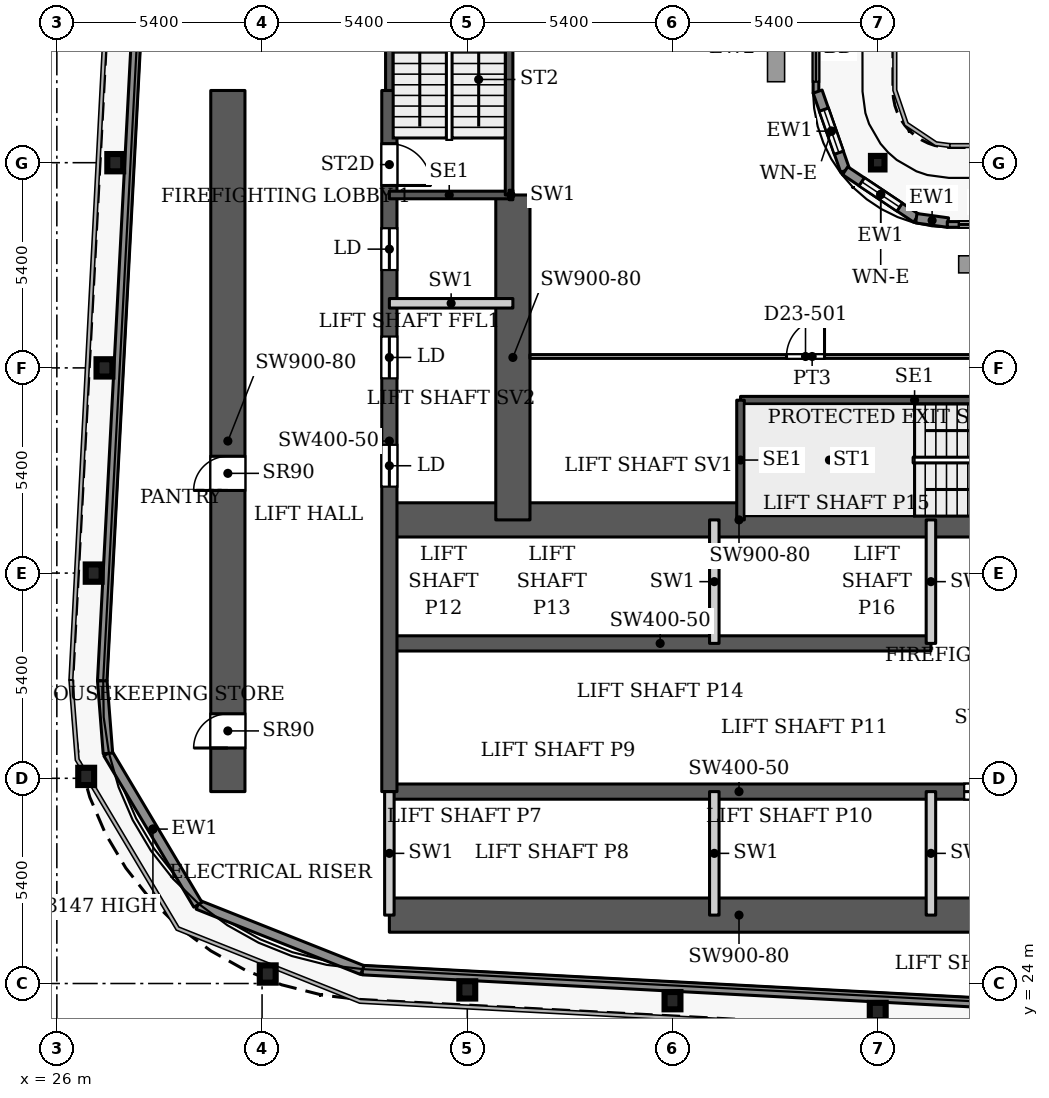
"""IFC4 building model, lengths in metres.
Left out: names, types, materials, properties, quantities, classifications, styles, units other than length and angle.
Written with IfcOpenShell. Run it as: python <this file> out.ifc"""

import sys

from ifc_helpers import new_model, si_unit, direction, frame, frame_2d, origin, origin_2d, place, context, subcontext, project, spatial, rectangle, hollow_rectangle, i_section, extrude, source, transform, mapped, element, fill, save


model = new_model("IFC4")
c1 = context("Model", 3, precision=1e-05, world=origin(), true_north=direction((0.0, 1.0)))
c2 = subcontext(c1, "Body", "Model", "MODEL_VIEW")
j1 = project(units=[si_unit("LENGTHUNIT", "METRE"), si_unit("PLANEANGLEUNIT", "RADIAN")], contexts=[c1])
p1 = place(None, origin())
s1 = spatial("IfcSite", under=j1, at=p1, CompositionType="ELEMENT")
p2 = place(p1, origin())
s2 = spatial("IfcBuilding", under=s1, at=p2, CompositionType="ELEMENT")
p3 = place(p2, frame((0.0, 0.0, 105.8)))
s3 = spatial("IfcBuildingStorey", under=s2, at=p3, CompositionType="ELEMENT", Elevation=105.8)
for number, where, z_axis, x_axis in (
    (1, (47.6, 23.264, 0.0), (0.0, 0.0, 1.0), (1.0, 0.0, 0.0)),
    (2, (42.2, 23.548, 0.0), (0.0, 0.0, 1.0), (1.0, 0.0, 0.0)),
    (3, (36.8, 23.832, 0.0), (0.0, 0.0, 1.0), (1.0, 0.0, 0.0)),
    (4, (31.549, 24.25, 0.0), (0.0, 0.0, 1.0), (1.0, 0.0, 0.0)),
    (5, (26.772, 29.45, 0.0), (0.0, 0.0, 1.0), (1.0, 0.0, 0.0)),
    (6, (26.969, 34.8, 0.0), (0.0, 0.0, 1.0), (1.0, 0.0, 0.0)),
    (7, (27.253, 40.2, 0.0), (0.0, 0.0, 1.0), (1.0, 0.0, 0.0)),
    (8, (27.537, 45.6, 0.0), (0.0, 0.0, 1.0), (1.0, 0.0, 0.0)),
):
    element("IfcColumn", number, at=place(p3, frame(where, z_axis=z_axis, x_axis=x_axis)), inside=s3, PredefinedType="COLUMN", context=c2, shape_type="SweptSolid", body=[
        extrude(i_section(OverallWidth=0.418, OverallDepth=0.455, WebThickness=0.042, FlangeThickness=0.068, FilletRadius=0.014, at=origin_2d()), origin(), (0.0, 0.0, 1.0), 3.9),
    ])
p4 = place(p3, frame((47.6, 45.6, 0.0), z_axis=(0.0, 0.0, 1.0), x_axis=(1.0, 0.0, 0.0)))
e9 = element("IfcColumn", 9, at=p4, inside=s3, PredefinedType="COLUMN", context=c2, shape_type="SweptSolid", body=[
    extrude(hollow_rectangle(XDim=0.356, YDim=0.356, WallThickness=0.016, InnerFilletRadius=0.016, OuterFilletRadius=0.032, at=origin_2d()), origin(), (0.0, 0.0, 1.0), 3.9),
])
p5 = place(p3, frame((34.75, 25.8, 0.0), z_axis=(0.0, 0.0, 1.0), x_axis=(1.0, 0.0, 0.0)))
e10 = element("IfcWall", 10, at=p5, inside=s3, PredefinedType="SHEAR", context=c2, shape_type="SweptSolid", body=[
    extrude(rectangle(XDim=18.4, YDim=0.9, at=frame_2d((9.2, 0.0))), origin(), (0.0, 0.0, 1.0), 3.9),
])
p6 = place(p3, frame((34.75, 29.05, 0.0), z_axis=(0.0, 0.0, 1.0), x_axis=(1.0, 0.0, 0.0)))
e11 = element("IfcWall", 11, at=p6, inside=s3, PredefinedType="SHEAR", context=c2, shape_type="SweptSolid", body=[
    extrude(rectangle(XDim=18.4, YDim=0.4, at=frame_2d((9.2, 0.0))), origin(), (0.0, 0.0, 1.0), 3.9),
])
p7 = place(p6, frame((15.125, 0.0, 0.0)))
e12 = element("IfcOpeningElement", 12, at=p7, cuts=e11, PredefinedType="OPENING", context=c2, shape_type="SweptSolid", body=[
    extrude(rectangle(XDim=1.1, YDim=2.2, at=frame_2d((0.55, 1.1))), frame((0.0, 0.21, 0.0), z_axis=(0.0, -1.0, 0.0), x_axis=(1.0, 0.0, 0.0)), (0.0, 0.0, 1.0), 0.42),
])
p8 = place(p3, frame((34.75, 32.95, 0.0), z_axis=(0.0, 0.0, 1.0), x_axis=(1.0, 0.0, 0.0)))
e13 = element("IfcWall", 13, at=p8, inside=s3, PredefinedType="SHEAR", context=c2, shape_type="SweptSolid", body=[
    extrude(rectangle(XDim=14.25, YDim=0.4, at=frame_2d((7.125, 0.0))), origin(), (0.0, 0.0, 1.0), 3.9),
])
p9 = place(p3, frame((34.75, 36.2, 0.0), z_axis=(0.0, 0.0, 1.0), x_axis=(1.0, 0.0, 0.0)))
e14 = element("IfcWall", 14, at=p9, inside=s3, PredefinedType="SHEAR", context=c2, shape_type="SweptSolid", body=[
    extrude(rectangle(XDim=18.4, YDim=0.9, at=frame_2d((9.2, 0.0))), origin(), (0.0, 0.0, 1.0), 3.9),
])
p10 = place(p9, frame((16.9, 0.0, 0.0)))
e15 = element("IfcOpeningElement", 15, at=p10, cuts=e14, PredefinedType="OPENING", context=c2, shape_type="SweptSolid", body=[
    extrude(rectangle(XDim=1.0, YDim=2.2, at=frame_2d((0.5, 1.1))), frame((0.0, 0.46, 0.0), z_axis=(0.0, -1.0, 0.0), x_axis=(1.0, 0.0, 0.0)), (0.0, 0.0, 1.0), 0.92),
])
p11 = place(p3, frame((34.75, 29.05, 0.0), z_axis=(0.0, 0.0, 1.0), x_axis=(0.0, 1.0, 0.0)))
e16 = element("IfcWall", 16, at=p11, inside=s3, PredefinedType="SHEAR", context=c2, shape_type="SweptSolid", body=[
    extrude(rectangle(XDim=18.45, YDim=0.4, at=frame_2d((9.225, 0.0))), origin(), (0.0, 0.0, 1.0), 3.9),
])
p12 = place(p11, frame((8.025, 0.0, 0.0)))
e17 = element("IfcOpeningElement", 17, at=p12, cuts=e16, PredefinedType="OPENING", context=c2, shape_type="SweptSolid", body=[
    extrude(rectangle(XDim=1.1, YDim=2.2, at=frame_2d((0.55, 1.1))), frame((0.0, 0.21, 0.0), z_axis=(0.0, -1.0, 0.0), x_axis=(1.0, 0.0, 0.0)), (0.0, 0.0, 1.0), 0.42),
])
p13 = place(p11, frame((10.875, 0.0, 0.0)))
e18 = element("IfcOpeningElement", 18, at=p13, cuts=e16, PredefinedType="OPENING", context=c2, shape_type="SweptSolid", body=[
    extrude(rectangle(XDim=1.1, YDim=2.2, at=frame_2d((0.55, 1.1))), frame((0.0, 0.21, 0.0), z_axis=(0.0, -1.0, 0.0), x_axis=(1.0, 0.0, 0.0)), (0.0, 0.0, 1.0), 0.42),
])
p14 = place(p11, frame((13.725, 0.0, 0.0)))
e19 = element("IfcOpeningElement", 19, at=p14, cuts=e16, PredefinedType="OPENING", context=c2, shape_type="SweptSolid", body=[
    extrude(rectangle(XDim=1.1, YDim=2.2, at=frame_2d((0.55, 1.1))), frame((0.0, 0.21, 0.0), z_axis=(0.0, -1.0, 0.0), x_axis=(1.0, 0.0, 0.0)), (0.0, 0.0, 1.0), 0.42),
])
p15 = place(p11, frame((15.95, 0.0, 0.0)))
e20 = element("IfcOpeningElement", 20, at=p15, cuts=e16, PredefinedType="OPENING", context=c2, shape_type="SweptSolid", body=[
    extrude(rectangle(XDim=1.1, YDim=2.2, at=frame_2d((0.55, 1.1))), frame((0.0, 0.21, 0.0), z_axis=(0.0, -1.0, 0.0), x_axis=(1.0, 0.0, 0.0)), (0.0, 0.0, 1.0), 0.42),
])
p16 = place(p3, frame((38.0, 36.2, 0.0), z_axis=(0.0, 0.0, 1.0), x_axis=(0.0, 1.0, 0.0)))
e21 = element("IfcWall", 21, at=p16, inside=s3, PredefinedType="SHEAR", context=c2, shape_type="SweptSolid", body=[
    extrude(rectangle(XDim=8.55, YDim=0.9, at=frame_2d((4.275, 0.0))), origin(), (0.0, 0.0, 1.0), 3.9),
])
p17 = place(p3, frame((30.5, 29.05, 0.0), z_axis=(0.0, 0.0, 1.0), x_axis=(0.0, 1.0, 0.0)))
e22 = element("IfcWall", 22, at=p17, inside=s3, PredefinedType="SHEAR", context=c2, shape_type="SweptSolid", body=[
    extrude(rectangle(XDim=18.45, YDim=0.9, at=frame_2d((9.225, 0.0))), origin(), (0.0, 0.0, 1.0), 3.9),
])
p18 = place(p17, frame((1.147, 0.0, 0.0)))
e23 = element("IfcOpeningElement", 23, at=p18, cuts=e22, PredefinedType="OPENING", context=c2, shape_type="SweptSolid", body=[
    extrude(rectangle(XDim=0.9, YDim=2.2, at=frame_2d((0.45, 1.1))), frame((0.0, 0.46, 0.0), z_axis=(0.0, -1.0, 0.0), x_axis=(1.0, 0.0, 0.0)), (0.0, 0.0, 1.0), 0.92),
])
p19 = place(p17, frame((7.925, 0.0, 0.0)))
e24 = element("IfcOpeningElement", 24, at=p19, cuts=e22, PredefinedType="OPENING", context=c2, shape_type="SweptSolid", body=[
    extrude(rectangle(XDim=0.9, YDim=2.2, at=frame_2d((0.45, 1.1))), frame((0.0, 0.46, 0.0), z_axis=(0.0, -1.0, 0.0), x_axis=(1.0, 0.0, 0.0)), (0.0, 0.0, 1.0), 0.92),
])
p20 = place(p3, frame((45.975, 49.83, 0.0), z_axis=(0.0, 0.0, 1.0), x_axis=(0.0, -1.0, 0.0)))
e25 = element("IfcWall", 25, at=p20, inside=s3, PredefinedType="SOLIDWALL", context=c2, shape_type="SweptSolid", body=[
    extrude(rectangle(XDim=2.4, YDim=0.15, at=frame_2d((1.2, 0.0))), origin(), (0.0, 0.0, 1.0), 3.75),
])
p21 = place(p20, frame((0.3, 0.0, 0.0)))
e26 = element("IfcOpeningElement", 26, at=p21, cuts=e25, PredefinedType="OPENING", context=c2, shape_type="SweptSolid", body=[
    extrude(rectangle(XDim=1.8, YDim=2.4, at=frame_2d((0.9, 1.2))), frame((0.0, 0.085, 0.0), z_axis=(0.0, -1.0, 0.0), x_axis=(1.0, 0.0, 0.0)), (0.0, 0.0, 1.0), 0.17),
])
p22 = place(p3, frame((46.018, 47.471, 0.0), z_axis=(0.0, 0.0, 1.0), x_axis=(0.328791208903, -0.944402637093, 0.0)))
e27 = element("IfcWall", 27, at=p22, inside=s3, PredefinedType="SOLIDWALL", context=c2, shape_type="SweptSolid", body=[
    extrude(rectangle(XDim=2.205, YDim=0.25, at=frame_2d((1.102, 0.0))), origin(), (0.0, 0.0, 1.0), 3.75),
])
p23 = place(p22, frame((0.503, 0.0, 0.6)))
e28 = element("IfcOpeningElement", 28, at=p23, cuts=e27, PredefinedType="OPENING", context=c2, shape_type="SweptSolid", body=[
    extrude(rectangle(XDim=1.2, YDim=2.1, at=frame_2d((0.6, 1.05))), frame((0.0, 0.135, 0.0), z_axis=(0.0, -1.0, 0.0), x_axis=(1.0, 0.0, 0.0)), (0.0, 0.0, 1.0), 0.27),
])
p24 = place(p3, frame((46.743, 45.389, 0.0), z_axis=(0.0, 0.0, 1.0), x_axis=(0.831449265529, -0.555600682912, 0.0)))
e29 = element("IfcWall", 29, at=p24, inside=s3, PredefinedType="SOLIDWALL", context=c2, shape_type="SweptSolid", body=[
    extrude(rectangle(XDim=2.251, YDim=0.25, at=frame_2d((1.126, 0.0))), origin(), (0.0, 0.0, 1.0), 3.75),
])
p25 = place(p24, frame((0.525, 0.0, 0.6)))
e30 = element("IfcOpeningElement", 30, at=p25, cuts=e29, PredefinedType="OPENING", context=c2, shape_type="SweptSolid", body=[
    extrude(rectangle(XDim=1.2, YDim=2.1, at=frame_2d((0.6, 1.05))), frame((0.0, 0.135, 0.0), z_axis=(0.0, -1.0, 0.0), x_axis=(1.0, 0.0, 0.0)), (0.0, 0.0, 1.0), 0.27),
])
p26 = place(p3, frame((48.615, 44.138, 0.0), z_axis=(0.0, 0.0, 1.0), x_axis=(0.990741504246, -0.135761819977, 0.0)))
e31 = element("IfcWall", 31, at=p26, inside=s3, PredefinedType="SOLIDWALL", context=c2, shape_type="SweptSolid", body=[
    extrude(rectangle(XDim=0.84, YDim=0.25, at=frame_2d((0.42, 0.0))), origin(), (0.0, 0.0, 1.0), 3.75),
])
p27 = place(p3, frame((49.43, 43.975, 0.0), z_axis=(0.0, 0.0, 1.0), x_axis=(1.0, 0.0, 0.0)))
e32 = element("IfcWall", 32, at=p27, inside=s3, PredefinedType="SOLIDWALL", context=c2, shape_type="SweptSolid", body=[
    extrude(rectangle(XDim=2.4, YDim=0.15, at=frame_2d((1.2, 0.0))), origin(), (0.0, 0.0, 1.0), 3.75),
])
p28 = place(p27, frame((0.3, 0.0, 0.0)))
e33 = element("IfcOpeningElement", 33, at=p28, cuts=e32, PredefinedType="OPENING", context=c2, shape_type="SweptSolid", body=[
    extrude(rectangle(XDim=1.8, YDim=2.4, at=frame_2d((0.9, 1.2))), frame((0.0, 0.085, 0.0), z_axis=(0.0, -1.0, 0.0), x_axis=(1.0, 0.0, 0.0)), (0.0, 0.0, 1.0), 0.17),
])
p29 = place(p3, frame((100.586, 20.85, 0.0), z_axis=(0.0, 0.0, 1.0), x_axis=(-0.99861746497, 0.052565755559, 0.0)))
e34 = element("IfcWall", 34, at=p29, inside=s3, PredefinedType="SOLIDWALL", context=c2, shape_type="SweptSolid", body=[
    extrude(rectangle(XDim=66.639, YDim=0.25, at=frame_2d((33.319, 0.0))), origin(), (0.0, 0.0, 1.0), 3.75),
])
p30 = place(p3, frame((34.039, 24.353, 0.0), z_axis=(0.0, 0.0, 1.0), x_axis=(-0.929352825399, 0.369192803184, 0.0)))
e35 = element("IfcWall", 35, at=p30, inside=s3, PredefinedType="SOLIDWALL", context=c2, shape_type="SweptSolid", body=[
    extrude(rectangle(XDim=4.656, YDim=0.25, at=frame_2d((2.328, 0.0))), origin(), (0.0, 0.0, 1.0), 3.75),
])
p31 = place(p3, frame((29.712, 26.072, 0.0), z_axis=(0.0, 0.0, 1.0), x_axis=(-0.511028049012, 0.859564036662, 0.0)))
e36 = element("IfcWall", 36, at=p31, inside=s3, PredefinedType="SOLIDWALL", context=c2, shape_type="SweptSolid", body=[
    extrude(rectangle(XDim=4.634, YDim=0.25, at=frame_2d((2.317, 0.0))), origin(), (0.0, 0.0, 1.0), 3.147),
])
p32 = place(p3, frame((27.344, 30.055, 0.0), z_axis=(0.0, 0.0, 1.0), x_axis=(-0.077571675317, 0.99698677784, 0.0)))
e37 = element("IfcWall", 37, at=p32, inside=s3, PredefinedType="SOLIDWALL", context=c2, shape_type="SweptSolid", body=[
    extrude(rectangle(XDim=1.92, YDim=0.25, at=frame_2d((0.96, 0.0))), origin(), (0.0, 0.0, 1.0), 3.75),
])
p33 = place(p3, frame((27.195, 31.969, 0.0), z_axis=(0.0, 0.0, 1.0), x_axis=(0.052555284099, 0.998618016117, 0.0)))
e38 = element("IfcWall", 38, at=p33, inside=s3, PredefinedType="SOLIDWALL", context=c2, shape_type="SweptSolid", body=[
    extrude(rectangle(XDim=61.38, YDim=0.25, at=frame_2d((30.69, 0.0))), origin(), (0.0, 0.0, 1.0), 3.75),
])
p34 = place(p3, frame((43.99, 39.35, 0.0), z_axis=(0.0, 0.0, 1.0), x_axis=(1.0, 0.0, 0.0)))
e39 = element("IfcWall", 39, at=p34, inside=s3, PredefinedType="SHEAR", context=c2, shape_type="SweptSolid", body=[
    extrude(rectangle(XDim=9.16, YDim=0.2, at=frame_2d((4.58, 0.0))), origin(), (0.0, 0.0, 1.0), 3.9),
])
p35 = place(p3, frame((43.99, 36.2, 0.0), z_axis=(0.0, 0.0, 1.0), x_axis=(0.0, 1.0, 0.0)))
e40 = element("IfcWall", 40, at=p35, inside=s3, PredefinedType="SHEAR", context=c2, shape_type="SweptSolid", body=[
    extrude(rectangle(XDim=3.15, YDim=0.2, at=frame_2d((1.575, 0.0))), origin(), (0.0, 0.0, 1.0), 3.9),
])
p36 = place(p3, frame((34.75, 44.75, 0.0), z_axis=(0.0, 0.0, 1.0), x_axis=(1.0, 0.0, 0.0)))
e41 = element("IfcWall", 41, at=p36, inside=s3, PredefinedType="SHEAR", context=c2, shape_type="SweptSolid", body=[
    extrude(rectangle(XDim=3.15, YDim=0.2, at=frame_2d((1.575, 0.0))), origin(), (0.0, 0.0, 1.0), 3.9),
])
p37 = place(p3, frame((34.75, 47.5, 0.0), z_axis=(0.0, 0.0, 1.0), x_axis=(0.0, 1.0, 0.0)))
e42 = element("IfcWall", 42, at=p37, inside=s3, PredefinedType="SHEAR", context=c2, shape_type="SweptSolid", body=[
    extrude(rectangle(XDim=6.41, YDim=0.2, at=frame_2d((3.205, 0.0))), origin(), (0.0, 0.0, 1.0), 3.9),
])
p38 = place(p3, frame((37.9, 44.75, 0.0), z_axis=(0.0, 0.0, 1.0), x_axis=(0.0, 1.0, 0.0)))
e43 = element("IfcWall", 43, at=p38, inside=s3, PredefinedType="SHEAR", context=c2, shape_type="SweptSolid", body=[
    extrude(rectangle(XDim=9.16, YDim=0.2, at=frame_2d((4.58, 0.0))), origin(), (0.0, 0.0, 1.0), 3.9),
])
for number, where, z_axis, x_axis in (
    (44, (34.75, 25.8, 0.0), (0.0, 0.0, 1.0), (0.0, 1.0, 0.0)),
    (45, (43.3, 25.8, 0.0), (0.0, 0.0, 1.0), (0.0, 1.0, 0.0)),
    (46, (43.3, 32.95, 0.0), (0.0, 0.0, 1.0), (0.0, 1.0, 0.0)),
    (47, (49.0, 25.8, 0.0), (0.0, 0.0, 1.0), (0.0, 1.0, 0.0)),
    (48, (49.0, 32.95, 0.0), (0.0, 0.0, 1.0), (0.0, 1.0, 0.0)),
    (49, (34.75, 41.9, 0.0), (0.0, 0.0, 1.0), (1.0, 0.0, 0.0)),
):
    element("IfcWall", number, at=place(p3, frame(where, z_axis=z_axis, x_axis=x_axis)), inside=s3, PredefinedType="PARTITIONING", context=c2, shape_type="SweptSolid", body=[
        extrude(rectangle(XDim=3.25, YDim=0.25, at=frame_2d((1.625, 0.0))), origin(), (0.0, 0.0, 1.0), 3.9),
    ])
p39 = place(p3, frame((37.9, 44.75, 0.0), z_axis=(0.0, 0.0, 1.0), x_axis=(1.0, 0.0, 0.0)))
e50 = element("IfcWall", 50, at=p39, inside=s3, PredefinedType="PARTITIONING", context=c2, shape_type="SweptSolid", body=[
    extrude(rectangle(XDim=0.1, YDim=0.25, at=frame_2d((0.05, 0.0))), origin(), (0.0, 0.0, 1.0), 3.9),
])
p40 = place(p3, frame((38.449, 40.5, 0.0), z_axis=(0.0, 0.0, 1.0), x_axis=(1.0, 0.0, 0.0)))
e51 = element("IfcWall", 51, at=p40, inside=s3, PredefinedType="PARTITIONING", context=c2, shape_type="SweptSolid", body=[
    extrude(rectangle(XDim=14.851, YDim=0.1, at=frame_2d((7.426, 0.0))), origin(), (0.0, 0.0, 1.0), 3.6),
])
p41 = place(p40, frame((6.751, 0.0, 0.0)))
e52 = element("IfcOpeningElement", 52, at=p41, cuts=e51, PredefinedType="OPENING", context=c2, shape_type="SweptSolid", body=[
    extrude(rectangle(XDim=1.0, YDim=2.1, at=frame_2d((0.5, 1.05))), frame((0.0, 0.06, 0.0), z_axis=(0.0, -1.0, 0.0), x_axis=(1.0, 0.0, 0.0)), (0.0, 0.0, 1.0), 0.12),
])
m1 = source(origin(), c2, "Body", "SweptSolid", [
    extrude(rectangle(XDim=1.8, YDim=2.4, at=frame_2d((0.9, 1.2))), frame((0.0, 0.025, 0.0), z_axis=(0.0, -1.0, 0.0), x_axis=(1.0, 0.0, 0.0)), (0.0, 0.0, 1.0), 0.05),
])
p42 = place(p21, origin())
e53 = element("IfcDoor", 53, at=p42, inside=s3, OperationType="SLIDING_TO_LEFT", PredefinedType="DOOR", context=c2, shape_type="MappedRepresentation", body=[
    mapped(m1, transform((0.0, 0.0, 0.0), x_axis=(1.0, 0.0, 0.0), y_axis=(0.0, 1.0, 0.0), z_axis=(0.0, 0.0, 1.0), scale=1.0)),
])
fill(e26, e53)
m2 = source(origin(), c2, "Body", "SweptSolid", [
    extrude(rectangle(XDim=1.2, YDim=2.1, at=frame_2d((0.6, 1.05))), frame((0.0, 0.03, 0.0), z_axis=(0.0, -1.0, 0.0), x_axis=(1.0, 0.0, 0.0)), (0.0, 0.0, 1.0), 0.06),
])
p43 = place(p23, origin())
e54 = element("IfcWindow", 54, at=p43, inside=s3, PartitioningType="SINGLE_PANEL", PredefinedType="WINDOW", context=c2, shape_type="MappedRepresentation", body=[
    mapped(m2, transform((0.0, 0.0, 0.0), x_axis=(1.0, 0.0, 0.0), y_axis=(0.0, 1.0, 0.0), z_axis=(0.0, 0.0, 1.0), scale=1.0)),
])
fill(e28, e54)
p44 = place(p25, origin())
e55 = element("IfcWindow", 55, at=p44, inside=s3, PartitioningType="SINGLE_PANEL", PredefinedType="WINDOW", context=c2, shape_type="MappedRepresentation", body=[
    mapped(m2, transform((0.0, 0.0, 0.0), x_axis=(1.0, 0.0, 0.0), y_axis=(0.0, 1.0, 0.0), z_axis=(0.0, 0.0, 1.0), scale=1.0)),
])
fill(e30, e55)
p45 = place(p28, origin())
e56 = element("IfcDoor", 56, at=p45, inside=s3, OperationType="SLIDING_TO_LEFT", PredefinedType="DOOR", context=c2, shape_type="MappedRepresentation", body=[
    mapped(m1, transform((0.0, 0.0, 0.0), x_axis=(1.0, 0.0, 0.0), y_axis=(0.0, 1.0, 0.0), z_axis=(0.0, 0.0, 1.0), scale=1.0)),
])
fill(e33, e56)
m3 = source(origin(), c2, "Body", "SweptSolid", [
    extrude(rectangle(XDim=1.1, YDim=2.2, at=frame_2d((0.55, 1.1))), frame((0.0, 0.025, 0.0), z_axis=(0.0, -1.0, 0.0), x_axis=(1.0, 0.0, 0.0)), (0.0, 0.0, 1.0), 0.05),
])
p46 = place(p12, origin())
e57 = element("IfcDoor", 57, at=p46, inside=s3, OperationType="SLIDING_TO_LEFT", PredefinedType="DOOR", context=c2, shape_type="MappedRepresentation", body=[
    mapped(m3, transform((0.0, 0.0, 0.0), x_axis=(1.0, 0.0, 0.0), y_axis=(0.0, 1.0, 0.0), z_axis=(0.0, 0.0, 1.0), scale=1.0)),
])
fill(e17, e57)
p47 = place(p13, origin())
e58 = element("IfcDoor", 58, at=p47, inside=s3, OperationType="SLIDING_TO_LEFT", PredefinedType="DOOR", context=c2, shape_type="MappedRepresentation", body=[
    mapped(m3, transform((0.0, 0.0, 0.0), x_axis=(1.0, 0.0, 0.0), y_axis=(0.0, 1.0, 0.0), z_axis=(0.0, 0.0, 1.0), scale=1.0)),
])
fill(e18, e58)
p48 = place(p14, origin())
e59 = element("IfcDoor", 59, at=p48, inside=s3, OperationType="SLIDING_TO_LEFT", PredefinedType="DOOR", context=c2, shape_type="MappedRepresentation", body=[
    mapped(m3, transform((0.0, 0.0, 0.0), x_axis=(1.0, 0.0, 0.0), y_axis=(0.0, 1.0, 0.0), z_axis=(0.0, 0.0, 1.0), scale=1.0)),
])
fill(e19, e59)
p49 = place(p7, origin())
e60 = element("IfcDoor", 60, at=p49, inside=s3, OperationType="SLIDING_TO_LEFT", PredefinedType="DOOR", context=c2, shape_type="MappedRepresentation", body=[
    mapped(m3, transform((0.0, 0.0, 0.0), x_axis=(1.0, 0.0, 0.0), y_axis=(0.0, 1.0, 0.0), z_axis=(0.0, 0.0, 1.0), scale=1.0)),
])
fill(e12, e60)
m4 = source(origin(), c2, "Body", "SweptSolid", [
    extrude(rectangle(XDim=0.9, YDim=2.2, at=frame_2d((0.45, 1.1))), frame((0.0, 0.025, 0.0), z_axis=(0.0, -1.0, 0.0), x_axis=(1.0, 0.0, 0.0)), (0.0, 0.0, 1.0), 0.05),
])
p50 = place(p18, origin())
e61 = element("IfcDoor", 61, at=p50, inside=s3, OperationType="SINGLE_SWING_LEFT", PredefinedType="DOOR", context=c2, shape_type="MappedRepresentation", body=[
    mapped(m4, transform((0.0, 0.0, 0.0), x_axis=(1.0, 0.0, 0.0), y_axis=(0.0, 1.0, 0.0), z_axis=(0.0, 0.0, 1.0), scale=1.0)),
])
fill(e23, e61)
p51 = place(p19, origin())
e62 = element("IfcDoor", 62, at=p51, inside=s3, OperationType="SINGLE_SWING_LEFT", PredefinedType="DOOR", context=c2, shape_type="MappedRepresentation", body=[
    mapped(m4, transform((0.0, 0.0, 0.0), x_axis=(1.0, 0.0, 0.0), y_axis=(0.0, 1.0, 0.0), z_axis=(0.0, 0.0, 1.0), scale=1.0)),
])
fill(e24, e62)
m5 = source(origin(), c2, "Body", "SweptSolid", [
    extrude(rectangle(XDim=1.1, YDim=2.2, at=frame_2d((0.55, 1.1))), frame((0.0, 0.025, 0.0), z_axis=(0.0, -1.0, 0.0), x_axis=(1.0, 0.0, 0.0)), (0.0, 0.0, 1.0), 0.05),
])
p52 = place(p15, origin())
e63 = element("IfcDoor", 63, at=p52, inside=s3, OperationType="SINGLE_SWING_RIGHT", PredefinedType="DOOR", context=c2, shape_type="MappedRepresentation", body=[
    mapped(m5, transform((0.0, 0.0, 0.0), x_axis=(1.0, 0.0, 0.0), y_axis=(0.0, 1.0, 0.0), z_axis=(0.0, 0.0, 1.0), scale=1.0)),
])
fill(e20, e63)
m6 = source(origin(), c2, "Body", "SweptSolid", [
    extrude(rectangle(XDim=1.0, YDim=2.1, at=frame_2d((0.5, 1.05))), frame((0.0, 0.025, 0.0), z_axis=(0.0, -1.0, 0.0), x_axis=(1.0, 0.0, 0.0)), (0.0, 0.0, 1.0), 0.05),
])
p53 = place(p41, origin())
e64 = element("IfcDoor", 64, at=p53, inside=s3, OperationType="SINGLE_SWING_LEFT", PredefinedType="DOOR", context=c2, shape_type="MappedRepresentation", body=[
    mapped(m6, transform((0.0, 0.0, 0.0), x_axis=(1.0, 0.0, 0.0), y_axis=(0.0, 1.0, 0.0), z_axis=(0.0, 0.0, 1.0), scale=1.0)),
])
fill(e52, e64)
save(model, sys.argv[1])
